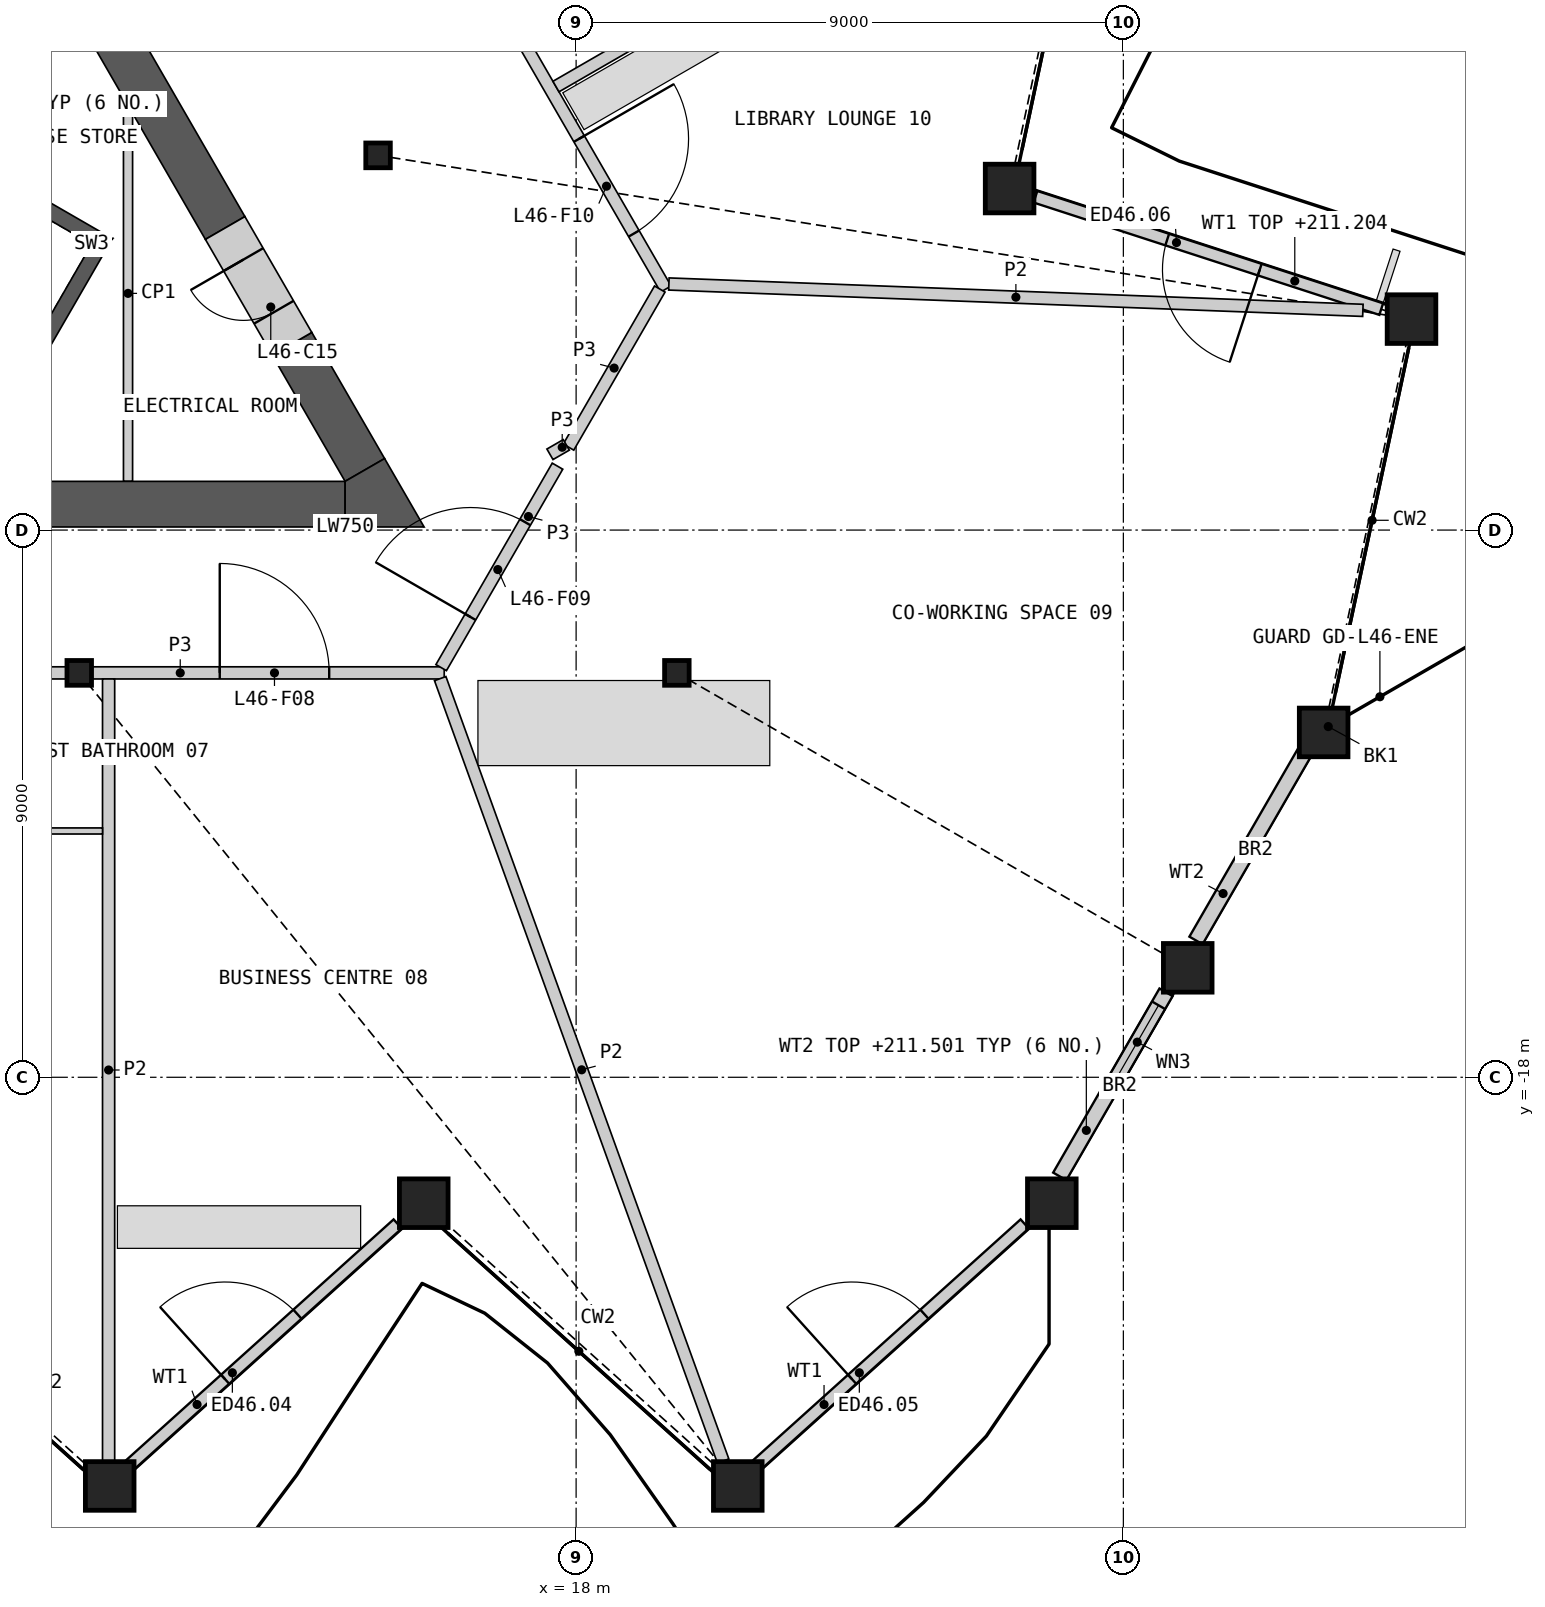
"""IFC4 building model, lengths in metres.
Left out: names, types, materials, properties, quantities, classifications, styles, units other than length and angle.
Written with IfcOpenShell. Run it as: python <this file> out.ifc"""

import sys

from ifc_helpers import new_model, si_unit, direction, frame, frame_2d, origin, origin_2d, place, context, subcontext, project, spatial, polyline, rectangle, hollow_rectangle, i_section, outline, extrude, element, fill, save


model = new_model("IFC4")
c1 = context("Model", 3, precision=1e-05, world=origin(), true_north=direction((0.0, 1.0)))
c2 = subcontext(c1, "Body", "Model", "MODEL_VIEW")
j1 = project(units=[si_unit("LENGTHUNIT", "METRE"), si_unit("PLANEANGLEUNIT", "RADIAN")], contexts=[c1])
p1 = place(None, origin())
s1 = spatial("IfcSite", under=j1, at=p1, CompositionType="ELEMENT")
p2 = place(p1, origin())
s2 = spatial("IfcBuilding", under=s1, at=p2, CompositionType="ELEMENT")
p3 = place(p2, frame((0.0, 0.0, 208.8)))
s3 = spatial("IfcBuildingStorey", under=s2, at=p3, CompositionType="ELEMENT", Elevation=208.8)
for number, where, z_axis, x_axis in (
    (1, (10.329, -24.722, 0.0), (0.0, 0.0, 1.0), (1.0, 0.0, 0.0)),
    (2, (15.494, -20.071, 0.0), (0.0, 0.0, 1.0), (1.0, 0.0, 0.0)),
    (3, (20.659, -24.722, 0.0), (0.0, 0.0, 1.0), (1.0, 0.0, 0.0)),
    (4, (25.823, -20.071, 0.0), (0.0, 0.0, 1.0), (1.0, 0.0, 0.0)),
    (5, (28.059, -16.2, 0.0), (0.0, 0.0, 1.0), (1.0, 0.0, 0.0)),
    (6, (30.294, -12.328, 0.0), (0.0, 0.0, 1.0), (1.0, 0.0, 0.0)),
    (7, (31.739, -5.53, 0.0), (0.0, 0.0, 1.0), (1.0, 0.0, 0.0)),
    (8, (25.129, -3.383, 0.0), (0.0, 0.0, 1.0), (1.0, 0.0, 0.0)),
):
    element("IfcColumn", number, at=place(p3, frame(where, z_axis=z_axis, x_axis=x_axis)), inside=s3, PredefinedType="COLUMN", context=c2, shape_type="SweptSolid", body=[
        extrude(hollow_rectangle(XDim=0.8, YDim=0.8, WallThickness=0.05, at=origin_2d()), origin(), (0.0, 0.0, 1.0), 3.6),
    ])
for number, where, z_axis, x_axis in (
    (9, (9.828, -11.349, 0.0), (0.0, 0.0, 1.0), (1.0, 0.0, 0.0)),
    (10, (19.657, -11.349, 0.0), (0.0, 0.0, 1.0), (1.0, 0.0, 0.0)),
    (11, (14.743, -2.837, 0.0), (0.0, 0.0, 1.0), (1.0, 0.0, 0.0)),
):
    element("IfcColumn", number, at=place(p3, frame(where, z_axis=z_axis, x_axis=x_axis)), inside=s3, PredefinedType="COLUMN", context=c2, shape_type="SweptSolid", body=[
        extrude(i_section(OverallWidth=0.404, OverallDepth=0.407, WebThickness=0.027, FlangeThickness=0.044, at=origin_2d()), origin(), (0.0, 0.0, 1.0), 3.6),
    ])
p4 = place(p3, frame((10.667, -24.373, 0.0), z_axis=(0.0, 0.0, 1.0), x_axis=(0.743154671439, 0.669119671149, 0.0)))
e12 = element("IfcWall", 12, at=p4, inside=s3, PredefinedType="SOLIDWALL", context=c2, shape_type="SweptSolid", body=[
    extrude(rectangle(XDim=5.919, YDim=0.2, at=frame_2d((2.959, 0.0))), origin(), (0.0, 0.0, 1.0), 2.701),
])
p5 = place(p4, frame((2.101, 0.0, 0.0)))
e13 = element("IfcOpeningElement", 13, at=p5, cuts=e12, PredefinedType="OPENING", context=c2, shape_type="SweptSolid", body=[
    extrude(rectangle(XDim=1.6, YDim=2.4, at=frame_2d((0.8, 1.2))), frame((0.0, 0.11, 0.0), z_axis=(0.0, -1.0, 0.0), x_axis=(1.0, 0.0, 0.0)), (0.0, 0.0, 1.0), 0.22),
])
p6 = place(p3, frame((20.978, -24.373, 0.0), z_axis=(0.0, 0.0, 1.0), x_axis=(0.743154671439, 0.669119671149, 0.0)))
e14 = element("IfcWall", 14, at=p6, inside=s3, PredefinedType="SOLIDWALL", context=c2, shape_type="SweptSolid", body=[
    extrude(rectangle(XDim=5.919, YDim=0.2, at=frame_2d((2.959, 0.0))), origin(), (0.0, 0.0, 1.0), 2.701),
])
p7 = place(p6, frame((2.101, 0.0, 0.0)))
e15 = element("IfcOpeningElement", 15, at=p7, cuts=e14, PredefinedType="OPENING", context=c2, shape_type="SweptSolid", body=[
    extrude(rectangle(XDim=1.6, YDim=2.4, at=frame_2d((0.8, 1.2))), frame((0.0, 0.11, 0.0), z_axis=(0.0, -1.0, 0.0), x_axis=(1.0, 0.0, 0.0)), (0.0, 0.0, 1.0), 0.22),
])
p8 = place(p3, frame((25.954, -19.631, 0.0), z_axis=(0.0, 0.0, 1.0), x_axis=(0.500006525586, 0.866021636203, 0.0)))
e16 = element("IfcWall", 16, at=p8, inside=s3, PredefinedType="SOLIDWALL", context=c2, shape_type="SweptSolid", body=[
    extrude(rectangle(XDim=3.497, YDim=0.25, at=frame_2d((1.748, 0.0))), origin(), (0.0, 0.0, 1.0), 2.701),
])
p9 = place(p8, frame((1.85, 0.0, 1.7)))
e17 = element("IfcOpeningElement", 17, at=p9, cuts=e16, PredefinedType="OPENING", context=c2, shape_type="SweptSolid", body=[
    extrude(rectangle(XDim=1.4, YDim=0.8, at=frame_2d((0.7, 0.4))), frame((0.0, 0.135, 0.0), z_axis=(0.0, -1.0, 0.0), x_axis=(1.0, 0.0, 0.0)), (0.0, 0.0, 1.0), 0.27),
])
p10 = place(p3, frame((28.195, -15.75, 0.0), z_axis=(0.0, 0.0, 1.0), x_axis=(0.500004952373, 0.866022544512, 0.0)))
e18 = element("IfcWall", 18, at=p10, inside=s3, PredefinedType="SOLIDWALL", context=c2, shape_type="SweptSolid", body=[
    extrude(rectangle(XDim=3.566, YDim=0.25, at=frame_2d((1.783, 0.0))), origin(), (0.0, 0.0, 1.0), 2.701),
])
p11 = place(p3, frame((31.241, -5.366, 0.0), z_axis=(0.0, 0.0, 1.0), x_axis=(-0.951052669354, 0.309028833792, 0.0)))
e19 = element("IfcWall", 19, at=p11, inside=s3, PredefinedType="SOLIDWALL", context=c2, shape_type="SweptSolid", body=[
    extrude(rectangle(XDim=5.98, YDim=0.2, at=frame_2d((2.99, 0.0))), origin(), (0.0, 0.0, 1.0), 2.404),
])
p12 = place(p11, frame((2.101, 0.0, 0.0)))
e20 = element("IfcOpeningElement", 20, at=p12, cuts=e19, PredefinedType="OPENING", context=c2, shape_type="SweptSolid", body=[
    extrude(rectangle(XDim=1.6, YDim=2.4, at=frame_2d((0.8, 1.2))), frame((0.0, 0.11, 0.0), z_axis=(0.0, -1.0, 0.0), x_axis=(1.0, 0.0, 0.0)), (0.0, 0.0, 1.0), 0.22),
])
p13 = place(p3, origin())
e21 = element("IfcWall", 21, at=p13, inside=s3, PredefinedType="SHEAR", context=c2, shape_type="SweptSolid", body=[
    extrude(outline(polyline([(8.83, -6.881), (10.374, -4.206), (10.032, -4.298), (8.738, -6.539), (8.83, -6.881)])), origin(), (0.0, 0.0, 1.0), 3.25),
])
p14 = place(p3, origin())
e22 = element("IfcWall", 22, at=p14, inside=s3, PredefinedType="SHEAR", context=c2, shape_type="SweptSolid", body=[
    extrude(outline(polyline([(10.032, -4.298), (10.374, -4.206), (5.307, -1.281), (5.182, -1.498), (10.032, -4.298)])), origin(), (0.0, 0.0, 1.0), 3.25),
])
p15 = place(p3, frame((10.631, -8.199, 0.0), z_axis=(0.0, 0.0, 1.0), x_axis=(0.0, 1.0, 0.0)))
e23 = element("IfcWall", 23, at=p15, inside=s3, PredefinedType="PARTITIONING", context=c2, shape_type="SweptSolid", body=[
    extrude(rectangle(XDim=6.184, YDim=0.15, at=frame_2d((3.092, 0.0))), origin(), (0.0, 0.0, 1.0), 3.25),
])
p16 = place(p3, frame((7.528, -8.574, 0.0), z_axis=(0.0, 0.0, 1.0), x_axis=(1.0, 0.0, 0.0)))
e24 = element("IfcWall", 24, at=p16, inside=s3, PredefinedType="SHEAR", context=c2, shape_type="SweptSolid", body=[
    extrude(rectangle(XDim=6.673, YDim=0.75, at=frame_2d((3.336, 0.0))), origin(), (0.0, 0.0, 1.0), 3.25),
])
p17 = place(p3, frame((12.228, -4.032, 0.0), z_axis=(0.0, 0.0, 1.0), x_axis=(-0.499993760127, 0.866029006347, 0.0)))
e25 = element("IfcWall", 25, at=p17, inside=s3, PredefinedType="SHEAR", context=c2, shape_type="SweptSolid", body=[
    extrude(rectangle(XDim=6.206, YDim=0.75, at=frame_2d((3.103, 0.0))), origin(), (0.0, 0.0, 1.0), 3.25),
])
p18 = place(p3, frame((14.526, -8.011, 0.0), z_axis=(0.0, 0.0, 1.0), x_axis=(-0.499943030081, 0.866058292884, 0.0)))
e26 = element("IfcWall", 26, at=p18, inside=s3, PredefinedType="SHEAR", context=c2, shape_type="SweptSolid", body=[
    extrude(rectangle(XDim=2.395, YDim=0.75, at=frame_2d((1.198, 0.0))), origin(), (0.0, 0.0, 1.0), 3.25),
])
p19 = place(p3, origin())
e27 = element("IfcWall", 27, at=p19, inside=s3, PredefinedType="SHEAR", context=c2, shape_type="SweptSolid", body=[
    extrude(outline(polyline([(14.201, -8.949), (14.201, -8.199), (14.851, -7.824), (15.5, -8.949), (14.201, -8.949)])), origin(), (0.0, 0.0, 1.0), 3.25),
])
p20 = place(p3, frame((13.328, -5.937, 0.0), z_axis=(0.0, 0.0, 1.0), x_axis=(-0.50002983664, 0.866008176907, 0.0)))
e28 = element("IfcWall", 28, at=p20, inside=s3, PredefinedType="SHEAR", context=c2, shape_type="SweptSolid", body=[
    extrude(rectangle(XDim=2.2, YDim=0.75, at=frame_2d((1.1, 0.0))), origin(), (0.0, 0.0, 1.0), 3.25),
])
p21 = place(p20, frame((0.6, 0.0, 0.0)))
e29 = element("IfcOpeningElement", 29, at=p21, cuts=e28, PredefinedType="OPENING", context=c2, shape_type="SweptSolid", body=[
    extrude(rectangle(XDim=1.0, YDim=2.1, at=frame_2d((0.5, 1.05))), frame((0.0, 0.385, 0.0), z_axis=(0.0, -1.0, 0.0), x_axis=(1.0, 0.0, 0.0)), (0.0, 0.0, 1.0), 0.77),
])
p22 = place(p3, frame((5.377, 19.385, 0.0), z_axis=(0.0, 0.0, 1.0), x_axis=(0.500000757641, -0.86602496636, 0.0)))
e30 = element("IfcWall", 30, at=p22, inside=s3, PredefinedType="PARTITIONING", context=c2, shape_type="SweptSolid", body=[
    extrude(rectangle(XDim=28.198, YDim=0.2, at=frame_2d((14.099, 0.0))), origin(), (0.0, 0.0, 1.0), 3.25),
])
p23 = place(p22, frame((25.345, 0.0, 0.0)))
e31 = element("IfcOpeningElement", 31, at=p23, cuts=e30, PredefinedType="OPENING", context=c2, shape_type="SweptSolid", body=[
    extrude(rectangle(XDim=1.8, YDim=2.1, at=frame_2d((0.9, 1.05))), frame((0.0, 0.11, 0.0), z_axis=(0.0, -1.0, 0.0), x_axis=(1.0, 0.0, 0.0)), (0.0, 0.0, 1.0), 0.22),
])
p24 = place(p22, frame((19.621, 0.0, 0.0)))
e32 = element("IfcOpeningElement", 32, at=p24, cuts=e30, PredefinedType="OPENING", context=c2, shape_type="SweptSolid", body=[
    extrude(rectangle(XDim=1.0, YDim=2.1, at=frame_2d((0.5, 1.05))), frame((0.0, 0.11, 0.0), z_axis=(0.0, -1.0, 0.0), x_axis=(1.0, 0.0, 0.0)), (0.0, 0.0, 1.0), 0.22),
])
p25 = place(p22, frame((16.409, 0.0, 0.0)))
e33 = element("IfcOpeningElement", 33, at=p25, cuts=e30, PredefinedType="OPENING", context=c2, shape_type="SweptSolid", body=[
    extrude(rectangle(XDim=1.1, YDim=2.1, at=frame_2d((0.55, 1.05))), frame((0.0, 0.11, 0.0), z_axis=(0.0, -1.0, 0.0), x_axis=(1.0, 0.0, 0.0)), (0.0, 0.0, 1.0), 0.22),
])
p26 = place(p22, frame((1.452, 0.0, 0.0)))
e34 = element("IfcOpeningElement", 34, at=p26, cuts=e30, PredefinedType="OPENING", context=c2, shape_type="SweptSolid", body=[
    extrude(rectangle(XDim=0.95, YDim=2.1, at=frame_2d((0.475, 1.05))), frame((0.0, 0.11, 0.0), z_axis=(0.0, -1.0, 0.0), x_axis=(1.0, 0.0, 0.0)), (0.0, 0.0, 1.0), 0.22),
])
p27 = place(p3, frame((0.214, -11.349, 0.0), z_axis=(0.0, 0.0, 1.0), x_axis=(1.0, 0.0, 0.0)))
e35 = element("IfcWall", 35, at=p27, inside=s3, PredefinedType="PARTITIONING", context=c2, shape_type="SweptSolid", body=[
    extrude(rectangle(XDim=9.401, YDim=0.2, at=frame_2d((4.701, 0.0))), origin(), (0.0, 0.0, 1.0), 3.25),
])
p28 = place(p27, frame((5.251, 0.0, 0.0)))
e36 = element("IfcOpeningElement", 36, at=p28, cuts=e35, PredefinedType="OPENING", context=c2, shape_type="SweptSolid", body=[
    extrude(rectangle(XDim=1.0, YDim=2.1, at=frame_2d((0.5, 1.05))), frame((0.0, 0.11, 0.0), z_axis=(0.0, -1.0, 0.0), x_axis=(1.0, 0.0, 0.0)), (0.0, 0.0, 1.0), 0.22),
])
p29 = place(p3, frame((10.042, -11.349, 0.0), z_axis=(0.0, 0.0, 1.0), x_axis=(1.0, 0.0, 0.0)))
e37 = element("IfcWall", 37, at=p29, inside=s3, PredefinedType="PARTITIONING", context=c2, shape_type="SweptSolid", body=[
    extrude(rectangle(XDim=5.789, YDim=0.2, at=frame_2d((2.894, 0.0))), origin(), (0.0, 0.0, 1.0), 3.25),
])
p30 = place(p29, frame((2.097, 0.0, 0.0)))
e38 = element("IfcOpeningElement", 38, at=p30, cuts=e37, PredefinedType="OPENING", context=c2, shape_type="SweptSolid", body=[
    extrude(rectangle(XDim=1.8, YDim=2.1, at=frame_2d((0.9, 1.05))), frame((0.0, 0.11, 0.0), z_axis=(0.0, -1.0, 0.0), x_axis=(1.0, 0.0, 0.0)), (0.0, 0.0, 1.0), 0.22),
])
p31 = place(p3, frame((15.781, -11.262, 0.0), z_axis=(0.0, 0.0, 1.0), x_axis=(0.499989446428, 0.866031496806, 0.0)))
e39 = element("IfcWall", 39, at=p31, inside=s3, PredefinedType="PARTITIONING", context=c2, shape_type="SweptSolid", body=[
    extrude(rectangle(XDim=3.826, YDim=0.2, at=frame_2d((1.913, 0.0))), origin(), (0.0, 0.0, 1.0), 3.25),
])
p32 = place(p31, frame((0.962, 0.0, 0.0)))
e40 = element("IfcOpeningElement", 40, at=p32, cuts=e39, PredefinedType="OPENING", context=c2, shape_type="SweptSolid", body=[
    extrude(rectangle(XDim=1.8, YDim=2.1, at=frame_2d((0.9, 1.05))), frame((0.0, 0.11, 0.0), z_axis=(0.0, -1.0, 0.0), x_axis=(1.0, 0.0, 0.0)), (0.0, 0.0, 1.0), 0.22),
])
p33 = place(p3, frame((17.875, -7.635, 0.0), z_axis=(0.0, 0.0, 1.0), x_axis=(0.499952404951, 0.866052881055, 0.0)))
e41 = element("IfcWall", 41, at=p33, inside=s3, PredefinedType="PARTITIONING", context=c2, shape_type="SweptSolid", body=[
    extrude(rectangle(XDim=3.002, YDim=0.2, at=frame_2d((1.501, 0.0))), origin(), (0.0, 0.0, 1.0), 3.25),
])
p34 = place(p3, frame((17.57, -7.754, 0.0), z_axis=(0.0, 0.0, 1.0), x_axis=(0.866054481515, 0.499949632511, 0.0)))
e42 = element("IfcWall", 42, at=p34, inside=s3, PredefinedType="PARTITIONING", context=c2, shape_type="SweptSolid", body=[
    extrude(rectangle(XDim=0.31, YDim=0.2, at=frame_2d((0.155, 0.0))), origin(), (0.0, 0.0, 1.0), 3.25),
])
p35 = place(p3, frame((15.765, -11.443, 0.0), z_axis=(0.0, 0.0, 1.0), x_axis=(0.340057865258, -0.940404513109, 0.0)))
e43 = element("IfcWall", 43, at=p35, inside=s3, PredefinedType="PARTITIONING", context=c2, shape_type="SweptSolid", body=[
    extrude(rectangle(XDim=13.684, YDim=0.2, at=frame_2d((6.842, 0.0))), origin(), (0.0, 0.0, 1.0), 2.404),
])
p36 = place(p3, frame((10.311, -24.312, 0.0), z_axis=(0.0, 0.0, 1.0), x_axis=(0.0, 1.0, 0.0)))
e44 = element("IfcWall", 44, at=p36, inside=s3, PredefinedType="PARTITIONING", context=c2, shape_type="SweptSolid", body=[
    extrude(rectangle(XDim=12.863, YDim=0.2, at=frame_2d((6.431, 0.0))), origin(), (0.0, 0.0, 1.0), 2.404),
])
p37 = place(p3, frame((19.526, -4.953, 0.0), z_axis=(0.0, 0.0, 1.0), x_axis=(0.999279155663, -0.037962732475, 0.0)))
e45 = element("IfcWall", 45, at=p37, inside=s3, PredefinedType="PARTITIONING", context=c2, shape_type="SweptSolid", body=[
    extrude(rectangle(XDim=11.422, YDim=0.2, at=frame_2d((5.711, 0.0))), origin(), (0.0, 0.0, 1.0), 2.404),
])
p38 = place(p3, frame((17.669, -1.705, 0.0), z_axis=(0.0, 0.0, 1.0), x_axis=(0.866032243237, 0.499988153533, 0.0)))
e46 = element("IfcWall", 46, at=p38, inside=s3, PredefinedType="PARTITIONING", context=c2, shape_type="SweptSolid", body=[
    extrude(rectangle(XDim=9.81, YDim=0.2, at=frame_2d((4.905, 0.0))), origin(), (0.0, 0.0, 1.0), 2.404),
])
p39 = place(p3, frame((7.561, -13.949, 0.0), z_axis=(0.0, 0.0, 1.0), x_axis=(1.0, 0.0, 0.0)))
e47 = element("IfcWall", 47, at=p39, inside=s3, PredefinedType="PARTITIONING", context=c2, shape_type="SweptSolid", body=[
    extrude(rectangle(XDim=2.65, YDim=0.1, at=frame_2d((1.325, 0.0))), origin(), (0.0, 0.0, 1.0), 2.404),
])
p40 = place(p39, frame((0.25, 0.0, 0.0)))
e48 = element("IfcOpeningElement", 48, at=p40, cuts=e47, PredefinedType="OPENING", context=c2, shape_type="SweptSolid", body=[
    extrude(rectangle(XDim=0.95, YDim=2.1, at=frame_2d((0.475, 1.05))), frame((0.0, 0.06, 0.0), z_axis=(0.0, -1.0, 0.0), x_axis=(1.0, 0.0, 0.0)), (0.0, 0.0, 1.0), 0.12),
])
p41 = place(p5, origin())
e49 = element("IfcDoor", 49, at=p41, inside=s3, OperationType="DOUBLE_DOOR_SINGLE_SWING", PredefinedType="DOOR", context=c2, shape_type="SweptSolid", body=[
    extrude(rectangle(XDim=1.6, YDim=2.4, at=frame_2d((0.8, 1.2))), frame((0.0, 0.025, 0.0), z_axis=(0.0, -1.0, 0.0), x_axis=(1.0, 0.0, 0.0)), (0.0, 0.0, 1.0), 0.05),
])
fill(e13, e49)
p42 = place(p7, origin())
e50 = element("IfcDoor", 50, at=p42, inside=s3, OperationType="DOUBLE_DOOR_SINGLE_SWING", PredefinedType="DOOR", context=c2, shape_type="SweptSolid", body=[
    extrude(rectangle(XDim=1.6, YDim=2.4, at=frame_2d((0.8, 1.2))), frame((0.0, 0.025, 0.0), z_axis=(0.0, -1.0, 0.0), x_axis=(1.0, 0.0, 0.0)), (0.0, 0.0, 1.0), 0.05),
])
fill(e15, e50)
p43 = place(p9, origin())
e51 = element("IfcWindow", 51, at=p43, inside=s3, PartitioningType="SINGLE_PANEL", PredefinedType="WINDOW", context=c2, shape_type="SweptSolid", body=[
    extrude(rectangle(XDim=1.4, YDim=0.8, at=frame_2d((0.7, 0.4))), frame((0.0, 0.03, 0.0), z_axis=(0.0, -1.0, 0.0), x_axis=(1.0, 0.0, 0.0)), (0.0, 0.0, 1.0), 0.06),
])
fill(e17, e51)
p44 = place(p12, origin())
e52 = element("IfcDoor", 52, at=p44, inside=s3, OperationType="DOUBLE_DOOR_SINGLE_SWING", PredefinedType="DOOR", context=c2, shape_type="SweptSolid", body=[
    extrude(rectangle(XDim=1.6, YDim=2.4, at=frame_2d((0.8, 1.2))), frame((0.0, 0.025, 0.0), z_axis=(0.0, -1.0, 0.0), x_axis=(1.0, 0.0, 0.0)), (0.0, 0.0, 1.0), 0.05),
])
fill(e20, e52)
p45 = place(p21, origin())
e53 = element("IfcDoor", 53, at=p45, inside=s3, OperationType="SINGLE_SWING_RIGHT", PredefinedType="DOOR", context=c2, shape_type="SweptSolid", body=[
    extrude(rectangle(XDim=1.0, YDim=2.1, at=frame_2d((0.5, 1.05))), frame((0.0, 0.13, 0.0), z_axis=(0.0, -1.0, 0.0), x_axis=(1.0, 0.0, 0.0)), (0.0, 0.0, 1.0), 0.05),
])
fill(e29, e53)
p46 = place(p30, origin())
e54 = element("IfcDoor", 54, at=p46, inside=s3, OperationType="DOUBLE_DOOR_SINGLE_SWING", PredefinedType="DOOR", context=c2, shape_type="SweptSolid", body=[
    extrude(rectangle(XDim=1.8, YDim=2.1, at=frame_2d((0.9, 1.05))), frame((0.0, 0.025, 0.0), z_axis=(0.0, -1.0, 0.0), x_axis=(1.0, 0.0, 0.0)), (0.0, 0.0, 1.0), 0.05),
])
fill(e38, e54)
p47 = place(p32, origin())
e55 = element("IfcDoor", 55, at=p47, inside=s3, OperationType="DOUBLE_DOOR_SINGLE_SWING", PredefinedType="DOOR", context=c2, shape_type="SweptSolid", body=[
    extrude(rectangle(XDim=1.8, YDim=2.1, at=frame_2d((0.9, 1.05))), frame((0.0, 0.025, 0.0), z_axis=(0.0, -1.0, 0.0), x_axis=(1.0, 0.0, 0.0)), (0.0, 0.0, 1.0), 0.05),
])
fill(e40, e55)
p48 = place(p23, origin())
e56 = element("IfcDoor", 56, at=p48, inside=s3, OperationType="DOUBLE_DOOR_SINGLE_SWING", PredefinedType="DOOR", context=c2, shape_type="SweptSolid", body=[
    extrude(rectangle(XDim=1.8, YDim=2.1, at=frame_2d((0.9, 1.05))), frame((0.0, 0.025, 0.0), z_axis=(0.0, -1.0, 0.0), x_axis=(1.0, 0.0, 0.0)), (0.0, 0.0, 1.0), 0.05),
])
fill(e31, e56)
save(model, sys.argv[1])
